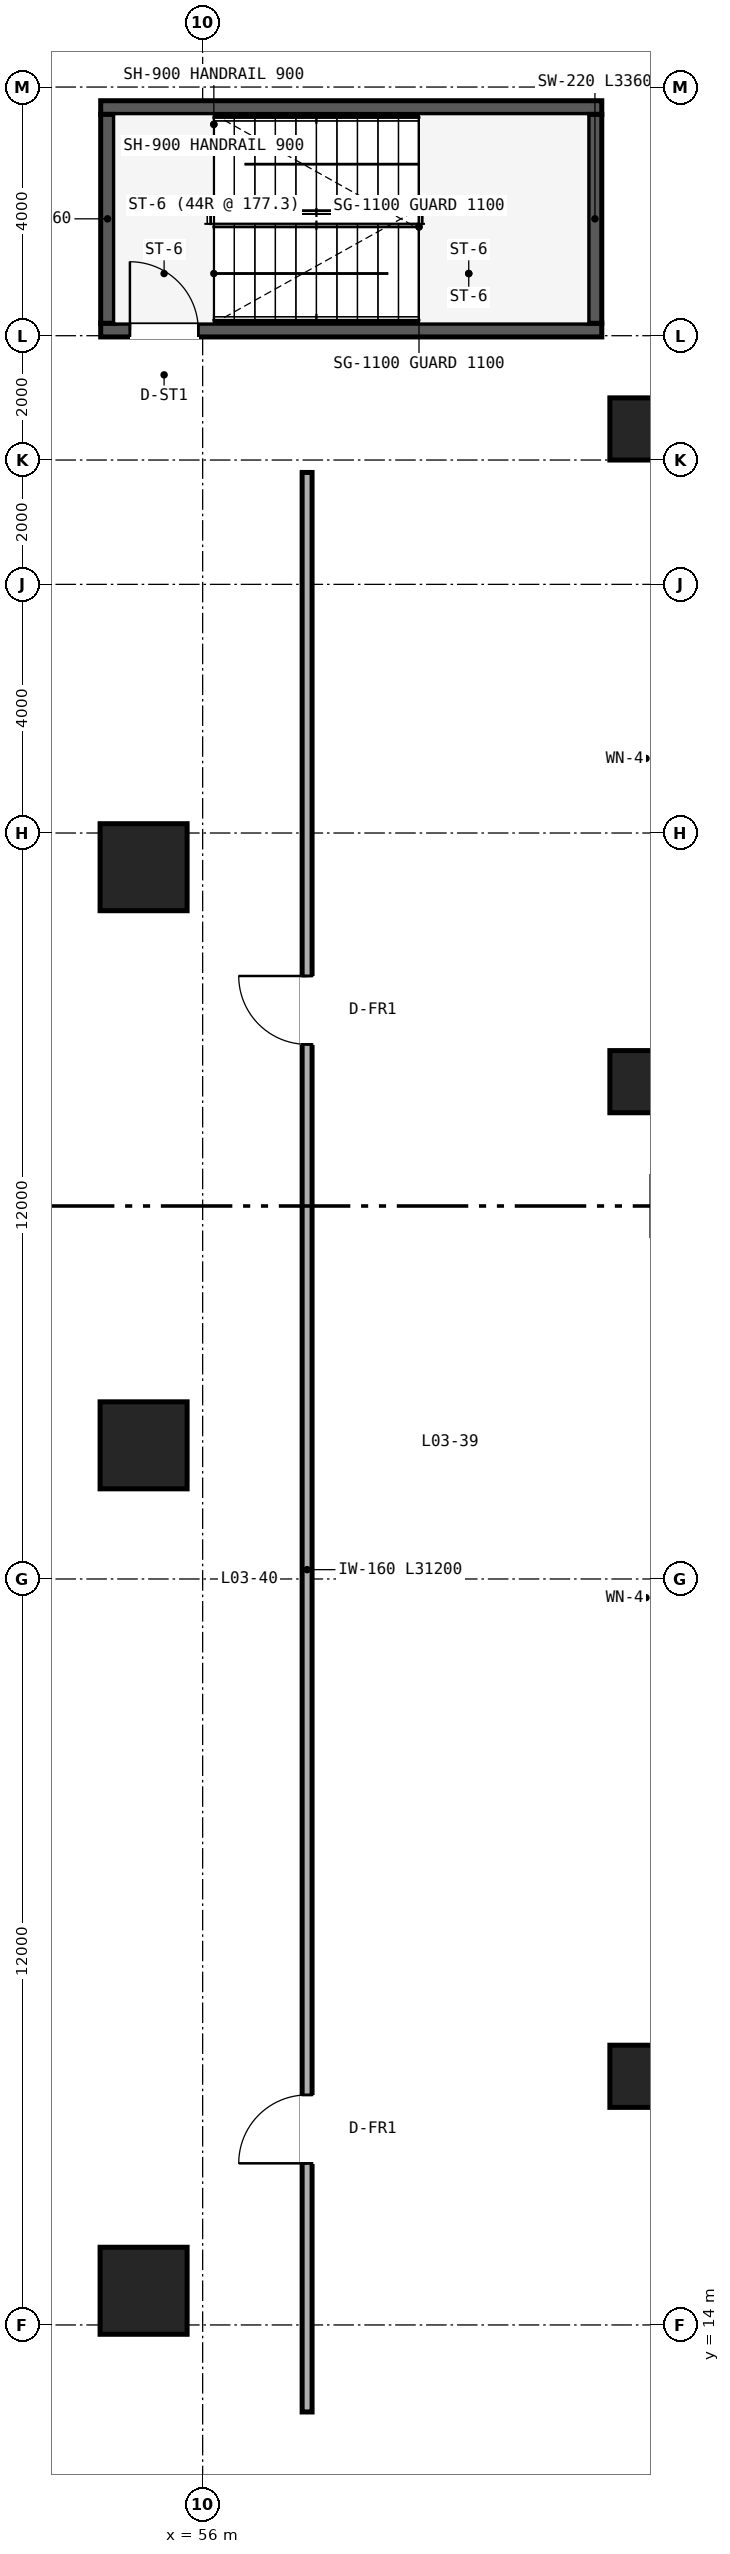
"""IFC4 building model, lengths in metres.
Left out: names, types, materials, properties, quantities, classifications, styles, units other than length and angle.
Written with IfcOpenShell. Run it as: python <this file> out.ifc"""

import sys

from ifc_helpers import new_model, si_unit, direction, frame, frame_2d, origin, origin_2d, place, context, subcontext, project, spatial, rectangle, extrude, source, transform, mapped, element, fill, save


model = new_model("IFC4")
c1 = context("Model", 3, precision=1e-05, world=origin(), true_north=direction((0.0, 1.0)))
c2 = subcontext(c1, "Body", "Model", "MODEL_VIEW")
j1 = project(units=[si_unit("LENGTHUNIT", "METRE"), si_unit("PLANEANGLEUNIT", "RADIAN")], contexts=[c1])
p1 = place(None, origin())
s1 = spatial("IfcSite", under=j1, at=p1, CompositionType="ELEMENT")
p2 = place(p1, origin())
s2 = spatial("IfcBuilding", under=s1, at=p2, CompositionType="ELEMENT")
p3 = place(p2, frame((0.0, 0.0, 11.4)))
s3 = spatial("IfcBuildingStorey", under=s2, at=p3, CompositionType="ELEMENT", Elevation=11.4)
p4 = place(p3, frame((54.36, 46.09, 0.0), z_axis=(0.0, 0.0, 1.0), x_axis=(1.0, 0.0, 0.0)))
e1 = element("IfcWall", 1, at=p4, inside=s3, PredefinedType="SHEAR", context=c2, shape_type="SweptSolid", body=[
    extrude(rectangle(XDim=8.06, YDim=0.22, at=frame_2d((4.03, 0.0))), origin(), (0.0, 0.0, 1.0), 7.6),
])
p5 = place(p4, frame((0.47, 0.0, 0.0)))
e2 = element("IfcOpeningElement", 2, at=p5, cuts=e1, PredefinedType="OPENING", context=c2, shape_type="SweptSolid", body=[
    extrude(rectangle(XDim=1.1, YDim=2.15, at=frame_2d((0.55, 1.075))), frame((0.0, 0.12, 0.0), z_axis=(0.0, -1.0, 0.0), x_axis=(1.0, 0.0, 0.0)), (0.0, 0.0, 1.0), 0.24),
])
p6 = place(p3, frame((54.36, 49.67, 0.0), z_axis=(0.0, 0.0, 1.0), x_axis=(1.0, 0.0, 0.0)))
e3 = element("IfcWall", 3, at=p6, inside=s3, PredefinedType="SHEAR", context=c2, shape_type="SweptSolid", body=[
    extrude(rectangle(XDim=8.06, YDim=0.22, at=frame_2d((4.03, 0.0))), origin(), (0.0, 0.0, 1.0), 7.6),
])
for number, where, z_axis, x_axis in (
    (4, (54.47, 46.2, 0.0), (0.0, 0.0, 1.0), (0.0, 1.0, 0.0)),
    (5, (62.31, 46.2, 0.0), (0.0, 0.0, 1.0), (0.0, 1.0, 0.0)),
):
    element("IfcWall", number, at=place(p3, frame(where, z_axis=z_axis, x_axis=x_axis)), inside=s3, PredefinedType="SHEAR", context=c2, shape_type="SweptSolid", body=[
        extrude(rectangle(XDim=3.36, YDim=0.22, at=frame_2d((1.68, 0.0))), origin(), (0.0, 0.0, 1.0), 7.6),
    ])
m1 = source(origin(), c2, "Body", "SweptSolid", [
    extrude(rectangle(XDim=1.0, YDim=1.0, at=origin_2d()), origin(), (0.0, 0.0, 1.0), 7.51),
])
for number, where, z_axis, x_axis in (
    (6, (63.05, 18.0, 0.0), (0.0, 0.0, 1.0), (1.0, 0.0, 0.0)),
    (7, (63.05, 34.0, 0.0), (0.0, 0.0, 1.0), (1.0, 0.0, 0.0)),
    (8, (63.05, 44.5, 0.0), (0.0, 0.0, 1.0), (1.0, 0.0, 0.0)),
):
    element("IfcColumn", number, at=place(p3, frame(where, z_axis=z_axis, x_axis=x_axis)), inside=s3, PredefinedType="COLUMN", context=c2, shape_type="MappedRepresentation", body=[
        mapped(m1, transform((0.0, 0.0, 0.0), scale=1.0)),
    ])
m2 = source(origin(), c2, "Body", "SweptSolid", [
    extrude(rectangle(XDim=1.4, YDim=1.4, at=origin_2d()), origin(), (0.0, 0.0, 1.0), 7.51),
])
for number, where, z_axis, x_axis in (
    (9, (55.05, 14.55, 0.0), (0.0, 0.0, 1.0), (1.0, 0.0, 0.0)),
    (10, (55.05, 28.15, 0.0), (0.0, 0.0, 1.0), (1.0, 0.0, 0.0)),
    (11, (55.05, 37.45, 0.0), (0.0, 0.0, 1.0), (1.0, 0.0, 0.0)),
):
    element("IfcColumn", number, at=place(p3, frame(where, z_axis=z_axis, x_axis=x_axis)), inside=s3, PredefinedType="COLUMN", context=c2, shape_type="MappedRepresentation", body=[
        mapped(m2, transform((0.0, 0.0, 0.0), scale=1.0)),
    ])
p7 = place(p3, frame((57.68, 12.6, 0.0), z_axis=(0.0, 0.0, 1.0), x_axis=(0.0, 1.0, 0.0)))
e12 = element("IfcWall", 12, at=p7, inside=s3, PredefinedType="PARTITIONING", context=c2, shape_type="SweptSolid", body=[
    extrude(rectangle(XDim=31.2, YDim=0.16, at=frame_2d((15.6, 0.0))), origin(), (0.0, 0.0, 1.0), 7.51),
])
p8 = place(p7, frame((4.0, 0.0, 0.0)))
e13 = element("IfcOpeningElement", 13, at=p8, cuts=e12, PredefinedType="OPENING", context=c2, shape_type="SweptSolid", body=[
    extrude(rectangle(XDim=1.1, YDim=2.15, at=frame_2d((0.55, 1.075))), frame((0.0, 0.09, 0.0), z_axis=(0.0, -1.0, 0.0), x_axis=(1.0, 0.0, 0.0)), (0.0, 0.0, 1.0), 0.18),
])
p9 = place(p7, frame((22.0, 0.0, 0.0)))
e14 = element("IfcOpeningElement", 14, at=p9, cuts=e12, PredefinedType="OPENING", context=c2, shape_type="SweptSolid", body=[
    extrude(rectangle(XDim=1.1, YDim=2.15, at=frame_2d((0.55, 1.075))), frame((0.0, 0.09, 0.0), z_axis=(0.0, -1.0, 0.0), x_axis=(1.0, 0.0, 0.0)), (0.0, 0.0, 1.0), 0.18),
])
m3 = source(origin(), c2, "Body", "SweptSolid", [
    extrude(rectangle(XDim=1.1, YDim=2.15, at=frame_2d((0.55, 1.075))), frame((0.0, 0.025, 0.0), z_axis=(0.0, -1.0, 0.0), x_axis=(1.0, 0.0, 0.0)), (0.0, 0.0, 1.0), 0.05),
])
p10 = place(p5, origin())
e15 = element("IfcDoor", 15, at=p10, inside=s3, OperationType="SINGLE_SWING_LEFT", PredefinedType="DOOR", context=c2, shape_type="MappedRepresentation", body=[
    mapped(m3, transform((0.0, 0.0, 0.0), scale=1.0)),
])
fill(e2, e15)
p11 = place(p8, origin())
e16 = element("IfcDoor", 16, at=p11, inside=s3, OperationType="SINGLE_SWING_LEFT", PredefinedType="DOOR", context=c2, shape_type="MappedRepresentation", body=[
    mapped(m3, transform((0.0, 0.0, 0.0), scale=1.0)),
])
fill(e13, e16)
p12 = place(p9, origin())
e17 = element("IfcDoor", 17, at=p12, inside=s3, OperationType="SINGLE_SWING_RIGHT", PredefinedType="DOOR", context=c2, shape_type="MappedRepresentation", body=[
    mapped(m3, transform((0.0, 0.0, 0.0), scale=1.0)),
])
fill(e14, e17)
save(model, sys.argv[1])
